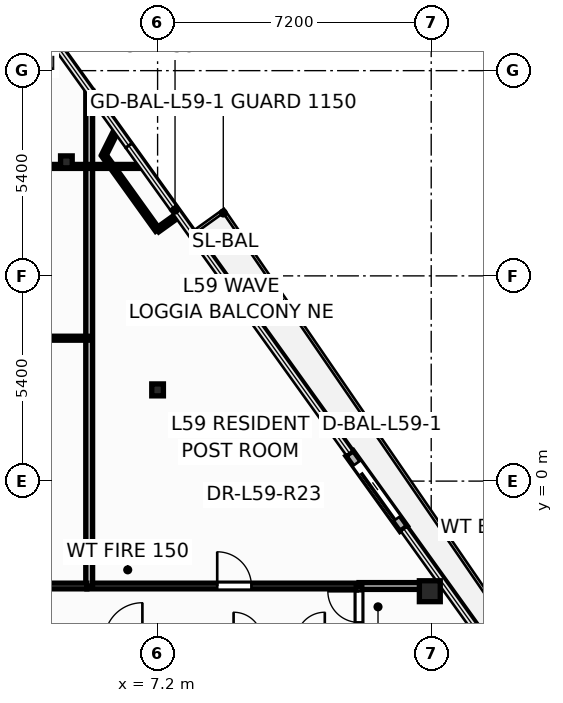
"""IFC4 building model, lengths in metres.
Left out: names, types, materials, properties, quantities, classifications, styles, units other than length and angle.
Written with IfcOpenShell. Run it as: python <this file> out.ifc"""

import sys

from ifc_helpers import new_model, si_unit, direction, frame, frame_2d, origin, origin_2d, place, context, subcontext, project, spatial, rectangle, hollow_circle, i_section, extrude, element, fill, save


model = new_model("IFC4")
c1 = context("Model", 3, precision=1e-05, world=origin(), true_north=direction((0.0, 1.0)))
c2 = subcontext(c1, "Body", "Model", "MODEL_VIEW")
j1 = project(units=[si_unit("LENGTHUNIT", "METRE"), si_unit("PLANEANGLEUNIT", "RADIAN")], contexts=[c1])
p1 = place(None, origin())
s1 = spatial("IfcSite", under=j1, at=p1, CompositionType="ELEMENT")
p2 = place(p1, origin())
s2 = spatial("IfcBuilding", under=s1, at=p2, CompositionType="ELEMENT")
p3 = place(p2, frame((0.0, 0.0, 225.3)))
s3 = spatial("IfcBuildingStorey", under=s2, at=p3, CompositionType="ELEMENT", Elevation=225.3)
for number, where, z_axis, x_axis in (
    (1, (14.363, -2.897, 0.0), (0.0, 0.0, 1.0), (1.0, 0.0, 0.0)),
    (2, (9.046, 4.51, 0.0), (0.0, 0.0, 1.0), (1.0, 0.0, 0.0)),
):
    element("IfcColumn", number, at=place(p3, frame(where, z_axis=z_axis, x_axis=x_axis)), inside=s3, PredefinedType="COLUMN", context=c2, shape_type="SweptSolid", body=[
        extrude(hollow_circle(Radius=0.275, WallThickness=0.024, at=origin_2d()), origin(), (0.0, 0.0, 1.0), 3.6),
    ])
for number, where, z_axis, x_axis in (
    (3, (7.2, 2.4, 0.0), (0.0, 0.0, 1.0), (1.0, 0.0, 0.0)),
    (4, (4.8, 8.4, 0.0), (0.0, 0.0, 1.0), (1.0, 0.0, 0.0)),
):
    element("IfcColumn", number, at=place(p3, frame(where, z_axis=z_axis, x_axis=x_axis)), inside=s3, PredefinedType="COLUMN", context=c2, shape_type="SweptSolid", body=[
        extrude(i_section(OverallWidth=0.307, OverallDepth=0.314, WebThickness=0.012, FlangeThickness=0.019, at=origin_2d()), origin(), (0.0, 0.0, 1.0), 3.6),
    ])
p4 = place(p3, frame((13.675, -1.252, -0.015), z_axis=(0.0, 0.0, 1.0), x_axis=(-0.583139062732, 0.812372349059, 0.0)))
e5 = element("IfcWall", 5, at=p4, inside=s3, PredefinedType="STANDARD", context=c2, shape_type="SweptSolid", body=[
    extrude(rectangle(XDim=2.44, YDim=0.24, at=frame_2d((1.22, 0.0))), origin(), (0.0, 0.0, 1.0), 2.853),
])
p5 = place(p4, frame((0.32, 0.0, 0.015)))
e6 = element("IfcOpeningElement", 6, at=p5, cuts=e5, PredefinedType="OPENING", context=c2, shape_type="SweptSolid", body=[
    extrude(rectangle(XDim=1.806, YDim=2.204, at=frame_2d((0.9, 1.102))), frame((0.0, 0.13, 0.0), z_axis=(0.0, -1.0, 0.0), x_axis=(1.0, 0.0, 0.0)), (0.0, 0.0, 1.0), 0.26),
])
p6 = place(p3, frame((5.34, -2.76, 0.0), z_axis=(0.0, 0.0, 1.0), x_axis=(1.0, 0.0, 0.0)))
e7 = element("IfcWall", 7, at=p6, inside=s3, PredefinedType="PARTITIONING", context=c2, shape_type="SweptSolid", body=[
    extrude(rectangle(XDim=7.16, YDim=0.15, at=frame_2d((3.58, 0.0))), origin(), (0.0, 0.0, 1.0), 2.295),
])
p7 = place(p6, frame((3.429, 0.0, 0.0)))
e8 = element("IfcOpeningElement", 8, at=p7, cuts=e7, PredefinedType="OPENING", context=c2, shape_type="SweptSolid", body=[
    extrude(rectangle(XDim=0.906, YDim=2.104, at=frame_2d((0.45, 1.052))), frame((0.0, 0.085, 0.0), z_axis=(0.0, -1.0, 0.0), x_axis=(1.0, 0.0, 0.0)), (0.0, 0.0, 1.0), 0.17),
])
p8 = place(p3, frame((5.4, -2.76, 0.0), z_axis=(0.0, 0.0, 1.0), x_axis=(0.0, 1.0, 0.0)))
e9 = element("IfcWall", 9, at=p8, inside=s3, PredefinedType="PARTITIONING", context=c2, shape_type="SweptSolid", body=[
    extrude(rectangle(XDim=13.037, YDim=0.18, at=frame_2d((6.518, 0.0))), origin(), (0.0, 0.0, 1.0), 2.295),
])
p9 = place(p3, frame((1.38, 8.28, 0.0), z_axis=(0.0, 0.0, 1.0), x_axis=(1.0, 0.0, 0.0)))
e10 = element("IfcWall", 10, at=p9, inside=s3, PredefinedType="PARTITIONING", context=c2, shape_type="SweptSolid", body=[
    extrude(rectangle(XDim=5.453, YDim=0.105, at=frame_2d((2.727, 0.0))), origin(), (0.0, 0.0, 1.0), 2.595),
])
p10 = place(p9, frame((0.597, 0.0, 0.0)))
e11 = element("IfcOpeningElement", 11, at=p10, cuts=e10, PredefinedType="OPENING", context=c2, shape_type="SweptSolid", body=[
    extrude(rectangle(XDim=0.886, YDim=2.104, at=frame_2d((0.44, 1.052))), frame((0.0, 0.062, 0.0), z_axis=(0.0, -1.0, 0.0), x_axis=(1.0, 0.0, 0.0)), (0.0, 0.0, 1.0), 0.125),
])
p11 = place(p3, frame((0.24, -2.76, 0.0), z_axis=(0.0, 0.0, 1.0), x_axis=(1.0, 0.0, 0.0)))
e12 = element("IfcWall", 12, at=p11, inside=s3, PredefinedType="PARTITIONING", context=c2, shape_type="SweptSolid", body=[
    extrude(rectangle(XDim=5.098, YDim=0.15, at=frame_2d((2.549, 0.0))), origin(), (0.0, 0.0, 1.0), 2.939),
])
p12 = place(p11, frame((1.32, 0.0, 0.0)))
e13 = element("IfcOpeningElement", 13, at=p12, cuts=e12, PredefinedType="OPENING", context=c2, shape_type="SweptSolid", body=[
    extrude(rectangle(XDim=0.906, YDim=2.104, at=frame_2d((0.45, 1.052))), frame((0.0, 0.085, 0.0), z_axis=(0.0, -1.0, 0.0), x_axis=(1.0, 0.0, 0.0)), (0.0, 0.0, 1.0), 0.17),
])
p13 = place(p3, frame((1.32, 3.76, 0.0), z_axis=(0.0, 0.0, 1.0), x_axis=(1.0, 0.0, 0.0)))
e14 = element("IfcWall", 14, at=p13, inside=s3, PredefinedType="PARTITIONING", context=c2, shape_type="SweptSolid", body=[
    extrude(rectangle(XDim=4.08, YDim=0.105, at=frame_2d((2.04, 0.0))), origin(), (0.0, 0.0, 1.0), 2.939),
])
p14 = place(p13, frame((0.396, 0.0, 0.0)))
e15 = element("IfcOpeningElement", 15, at=p14, cuts=e14, PredefinedType="OPENING", context=c2, shape_type="SweptSolid", body=[
    extrude(rectangle(XDim=0.886, YDim=2.104, at=frame_2d((0.44, 1.052))), frame((0.0, 0.062, 0.0), z_axis=(0.0, -1.0, 0.0), x_axis=(1.0, 0.0, 0.0)), (0.0, 0.0, 1.0), 0.125),
])
p15 = place(p3, frame((7.197, 6.607, 0.0), z_axis=(0.0, 0.0, 1.0), x_axis=(-0.583135111371, 0.81237518542, 0.0)))
e16 = element("IfcWall", 16, at=p15, inside=s3, PredefinedType="PARTITIONING", context=c2, shape_type="SweptSolid", body=[
    extrude(rectangle(XDim=2.421, YDim=0.12, at=frame_2d((1.21, 0.0))), origin(), (0.0, 0.0, 1.0), 3.32),
])
p16 = place(p3, frame((12.5, -2.76, 0.0), z_axis=(0.0, 0.0, 1.0), x_axis=(1.0, 0.0, 0.0)))
e17 = element("IfcWall", 17, at=p16, inside=s3, PredefinedType="PARTITIONING", context=c2, shape_type="SweptSolid", body=[
    extrude(rectangle(XDim=2.257, YDim=0.18, at=frame_2d((1.129, 0.0))), origin(), (0.0, 0.0, 1.0), 2.595),
])
p17 = place(p3, frame((12.5, -4.24, 0.0), z_axis=(0.0, 0.0, 1.0), x_axis=(0.0, 1.0, 0.0)))
e18 = element("IfcWall", 18, at=p17, inside=s3, PredefinedType="PARTITIONING", context=c2, shape_type="SweptSolid", body=[
    extrude(rectangle(XDim=1.48, YDim=0.15, at=frame_2d((0.74, 0.0))), origin(), (0.0, 0.0, 1.0), 2.295),
])
p18 = place(p17, frame((0.522, 0.0, 0.0)))
e19 = element("IfcOpeningElement", 19, at=p18, cuts=e18, PredefinedType="OPENING", context=c2, shape_type="SweptSolid", body=[
    extrude(rectangle(XDim=0.826, YDim=2.104, at=frame_2d((0.41, 1.052))), frame((0.0, 0.085, 0.0), z_axis=(0.0, -1.0, 0.0), x_axis=(1.0, 0.0, 0.0)), (0.0, 0.0, 1.0), 0.17),
])
p19 = place(p3, frame((5.785, 8.574, 0.0), z_axis=(0.0, 0.0, 1.0), x_axis=(0.447342600971, 0.894362676634, 0.0)))
e20 = element("IfcWall", 20, at=p19, inside=s3, PredefinedType="PARTITIONING", context=c2, shape_type="SweptSolid", body=[
    extrude(rectangle(XDim=0.757, YDim=0.12, at=frame_2d((0.378, 0.0))), origin(), (0.0, 0.0, 1.0), 2.838),
])
p20 = place(p3, frame((7.741, 6.998, 0.0), z_axis=(0.0, 0.0, 1.0), x_axis=(-0.812549510699, -0.582892179277, 0.0)))
e21 = element("IfcWall", 21, at=p20, inside=s3, PredefinedType="PARTITIONING", context=c2, shape_type="SweptSolid", body=[
    extrude(rectangle(XDim=0.67, YDim=0.12, at=frame_2d((0.335, 0.0))), origin(), (0.0, 0.0, 1.0), 2.838),
])
p21 = place(p5, origin())
e22 = element("IfcDoor", 22, at=p21, inside=s3, OperationType="SLIDING_TO_LEFT", PredefinedType="DOOR", context=c2, shape_type="SweptSolid", body=[
    extrude(rectangle(XDim=1.8, YDim=2.2, at=frame_2d((0.9, 1.1))), frame((0.0, 0.025, 0.0), z_axis=(0.0, -1.0, 0.0), x_axis=(1.0, 0.0, 0.0)), (0.0, 0.0, 1.0), 0.05),
])
fill(e6, e22)
p22 = place(p18, origin())
e23 = element("IfcDoor", 23, at=p22, inside=s3, OperationType="SINGLE_SWING_RIGHT", PredefinedType="DOOR", context=c2, shape_type="SweptSolid", body=[
    extrude(rectangle(XDim=0.82, YDim=2.1, at=frame_2d((0.41, 1.05))), frame((0.0, 0.025, 0.0), z_axis=(0.0, -1.0, 0.0), x_axis=(1.0, 0.0, 0.0)), (0.0, 0.0, 1.0), 0.05),
])
fill(e19, e23)
p23 = place(p7, origin())
e24 = element("IfcDoor", 24, at=p23, inside=s3, OperationType="SINGLE_SWING_LEFT", PredefinedType="DOOR", context=c2, shape_type="SweptSolid", body=[
    extrude(rectangle(XDim=0.9, YDim=2.1, at=frame_2d((0.45, 1.05))), frame((0.0, 0.025, 0.0), z_axis=(0.0, -1.0, 0.0), x_axis=(1.0, 0.0, 0.0)), (0.0, 0.0, 1.0), 0.05),
])
fill(e8, e24)
save(model, sys.argv[1])
